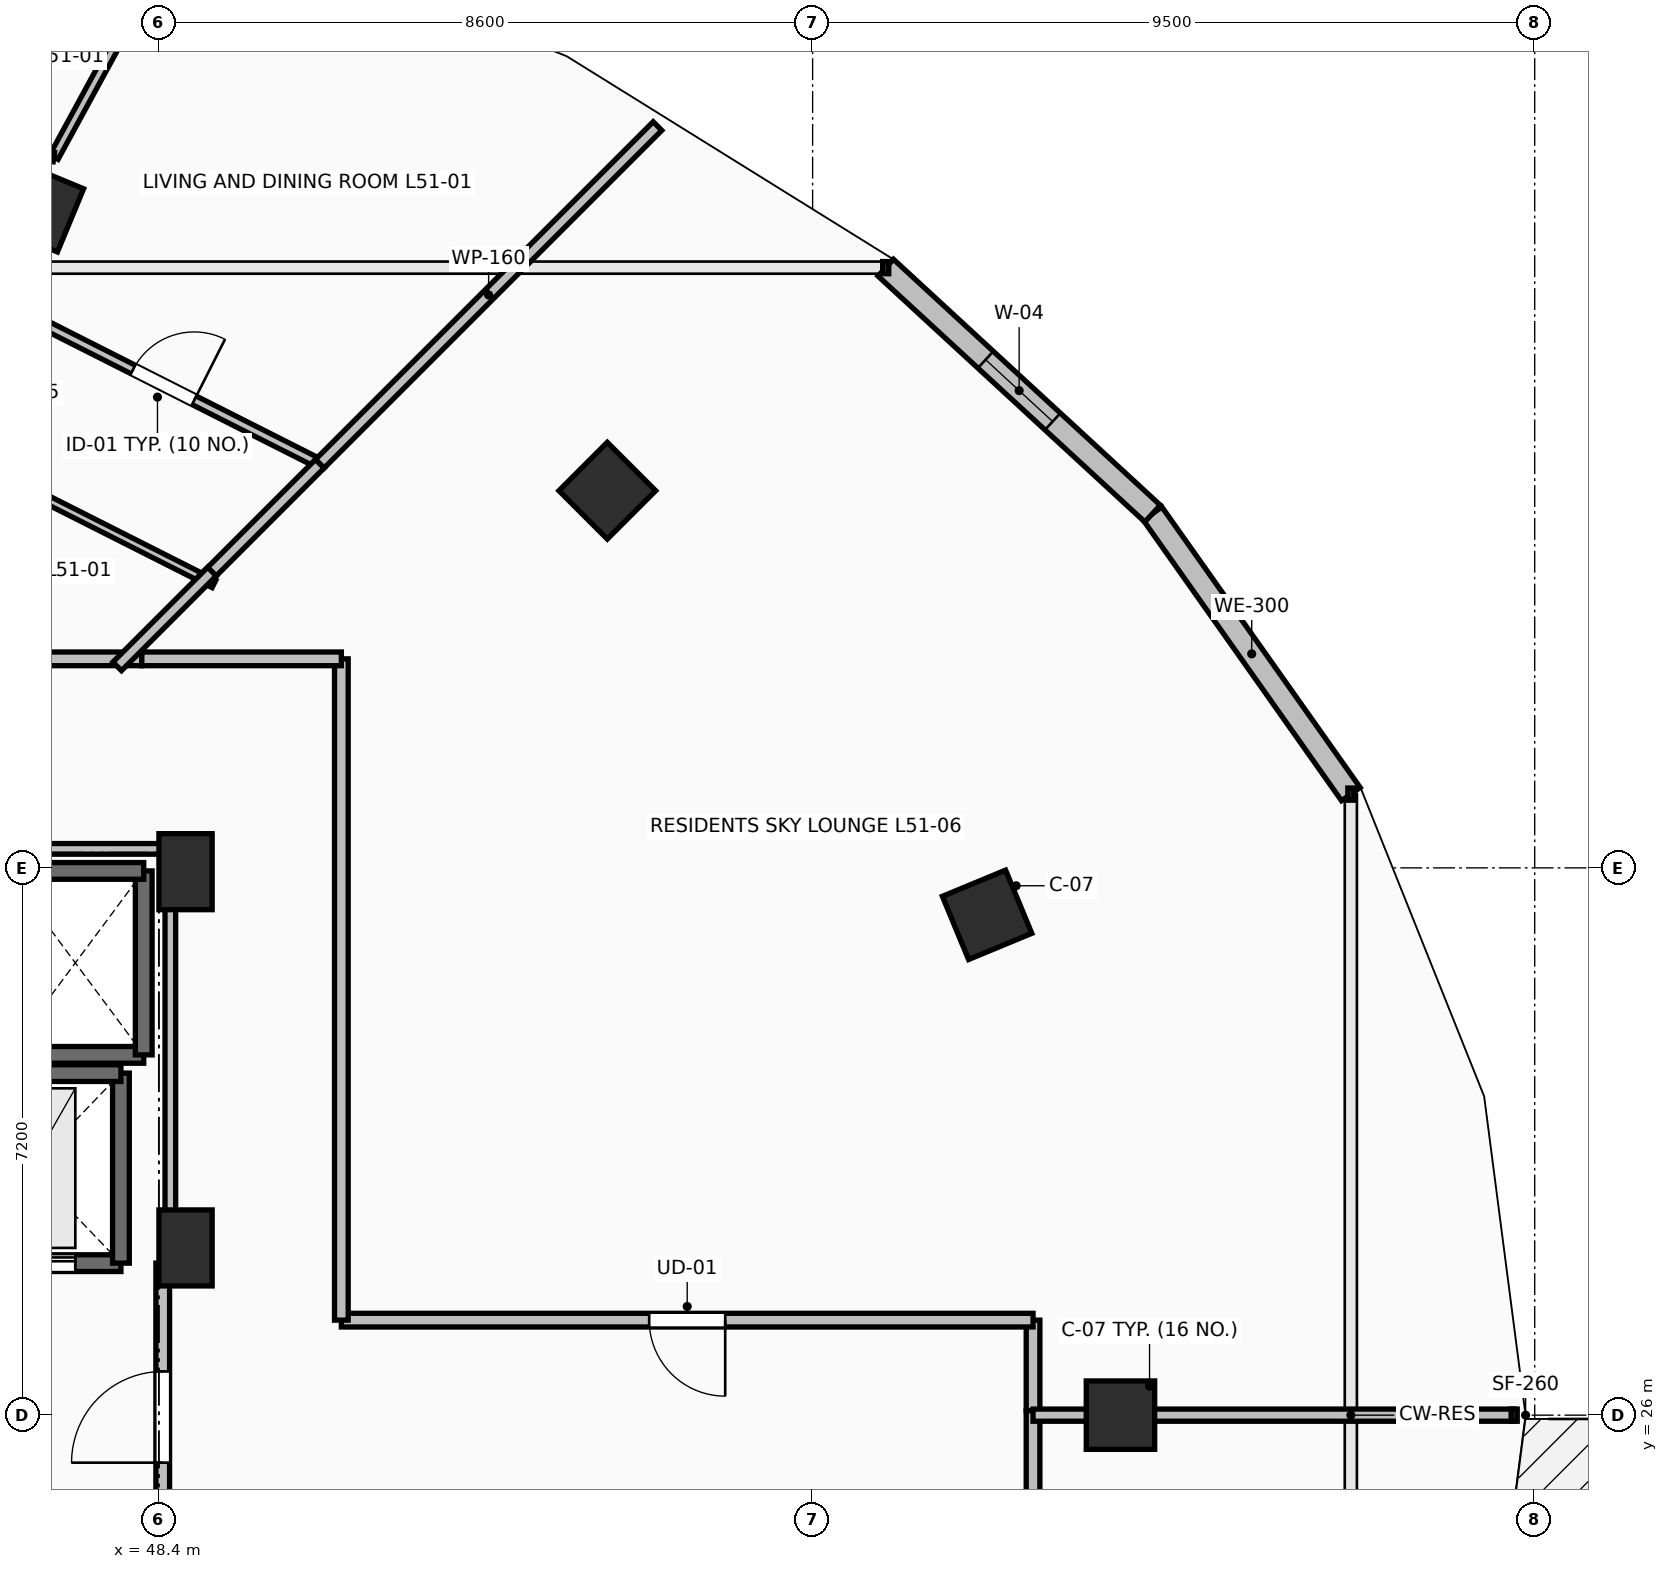
"""IFC4 building model, lengths in metres.
Left out: names, types, materials, properties, quantities, classifications, styles, units other than length and angle.
Written with IfcOpenShell. Run it as: python <this file> out.ifc"""

import sys

from ifc_helpers import new_model, si_unit, direction, frame, frame_2d, origin, origin_2d, place, context, subcontext, project, spatial, rectangle, extrude, element, fill, save


model = new_model("IFC4")
c1 = context("Model", 3, precision=1e-05, world=origin(), true_north=direction((0.0, 1.0)))
c2 = subcontext(c1, "Body", "Model", "MODEL_VIEW")
j1 = project(units=[si_unit("LENGTHUNIT", "METRE"), si_unit("PLANEANGLEUNIT", "RADIAN")], contexts=[c1])
p1 = place(None, origin())
s1 = spatial("IfcSite", under=j1, at=p1, CompositionType="ELEMENT")
p2 = place(p1, origin())
s2 = spatial("IfcBuilding", under=s1, at=p2, CompositionType="ELEMENT")
p3 = place(p2, frame((0.0, 0.0, 189.6)))
s3 = spatial("IfcBuildingStorey", under=s2, at=p3, CompositionType="ELEMENT", Elevation=189.6)
for number, where, z_axis, x_axis in (
    (1, (61.05, 26.0, 0.0), (0.0, 0.0, 1.0), (1.0, 0.0, 0.0)),
    (2, (59.295, 32.582, 0.0), (0.0, 0.0, 1.0), (0.924, 0.383, 0.0)),
    (3, (54.299, 38.162, 0.0), (0.0, 0.0, 1.0), (0.707, 0.707, 0.0)),
    (4, (46.821, 41.891, 0.0), (0.0, 0.0, 1.0), (0.383, 0.924, 0.0)),
):
    element("IfcColumn", number, at=place(p3, frame(where, z_axis=z_axis, x_axis=x_axis)), inside=s3, PredefinedType="COLUMN", context=c2, shape_type="SweptSolid", body=[
        extrude(rectangle(XDim=0.9, YDim=0.9, at=origin_2d()), origin(), (0.0, 0.0, 1.0), 3.5),
    ])
for number, where, z_axis, x_axis in (
    (5, (48.75, 33.15, 0.0), (0.0, 0.0, 1.0), (1.0, 0.0, 0.0)),
    (6, (48.75, 28.2, 0.0), (0.0, 0.0, 1.0), (1.0, 0.0, 0.0)),
):
    element("IfcColumn", number, at=place(p3, frame(where, z_axis=z_axis, x_axis=x_axis)), inside=s3, PredefinedType="PILASTER", context=c2, shape_type="SweptSolid", body=[
        extrude(rectangle(XDim=0.7, YDim=1.0, at=origin_2d()), origin(), (0.0, 0.0, 1.0), 3.5),
    ])
p4 = place(p3, frame((64.081, 34.17, 0.0), z_axis=(0.0, 0.0, 1.0), x_axis=(-0.577168747264, 0.81662490605, 0.0)))
e7 = element("IfcWall", 7, at=p4, inside=s3, PredefinedType="STANDARD", context=c2, shape_type="SweptSolid", body=[
    extrude(rectangle(XDim=4.52, YDim=0.3, at=frame_2d((2.26, 0.0))), origin(), (0.0, 0.0, 1.0), 3.24),
])
p5 = place(p3, frame((61.472, 37.861, 0.0), z_axis=(0.0, 0.0, 1.0), x_axis=(-0.735359993374, 0.677676678177, 0.0)))
e8 = element("IfcWall", 8, at=p5, inside=s3, PredefinedType="STANDARD", context=c2, shape_type="SweptSolid", body=[
    extrude(rectangle(XDim=4.774, YDim=0.3, at=frame_2d((2.387, 0.0))), origin(), (0.0, 0.0, 1.0), 3.24),
])
p6 = place(p5, frame((1.787, 0.0, 0.85)))
e9 = element("IfcOpeningElement", 9, at=p6, cuts=e8, PredefinedType="OPENING", context=c2, shape_type="SweptSolid", body=[
    extrude(rectangle(XDim=1.2, YDim=2.1, at=frame_2d((0.6, 1.05))), frame((0.0, 0.165, 0.0), z_axis=(0.0, -1.0, 0.0), x_axis=(1.0, 0.0, 0.0)), (0.0, 0.0, 1.0), 0.33),
])
p7 = place(p3, frame((46.4, 30.74, 0.0), z_axis=(0.0, 0.0, 1.0), x_axis=(1.0, 0.0, 0.0)))
e10 = element("IfcWall", 10, at=p7, inside=s3, PredefinedType="SOLIDWALL", context=c2, shape_type="SweptSolid", body=[
    extrude(rectangle(XDim=1.8, YDim=0.22, at=frame_2d((0.9, 0.0))), origin(), (0.0, 0.0, 1.0), 3.24),
])
p8 = place(p3, frame((48.2, 30.74, 0.0), z_axis=(0.0, 0.0, 1.0), x_axis=(0.0, 1.0, 0.0)))
e11 = element("IfcWall", 11, at=p8, inside=s3, PredefinedType="SOLIDWALL", context=c2, shape_type="SweptSolid", body=[
    extrude(rectangle(XDim=2.42, YDim=0.22, at=frame_2d((1.21, 0.0))), origin(), (0.0, 0.0, 1.0), 3.24),
])
p9 = place(p3, frame((48.2, 33.16, 0.0), z_axis=(0.0, 0.0, 1.0), x_axis=(-1.0, 0.0, 0.0)))
e12 = element("IfcWall", 12, at=p9, inside=s3, PredefinedType="SOLIDWALL", context=c2, shape_type="SweptSolid", body=[
    extrude(rectangle(XDim=1.8, YDim=0.22, at=frame_2d((0.9, 0.0))), origin(), (0.0, 0.0, 1.0), 3.24),
])
p10 = place(p3, frame((45.5, 28.0, 0.0), z_axis=(0.0, 0.0, 1.0), x_axis=(1.0, 0.0, 0.0)))
e13 = element("IfcWall", 13, at=p10, inside=s3, PredefinedType="SHEAR", context=c2, shape_type="SweptSolid", body=[
    extrude(rectangle(XDim=2.4, YDim=0.22, at=frame_2d((1.2, 0.0))), origin(), (0.0, 0.0, 1.0), 3.24),
])
p11 = place(p10, frame((0.6, 0.0, 0.0)))
e14 = element("IfcOpeningElement", 14, at=p11, cuts=e13, PredefinedType="OPENING", context=c2, shape_type="SweptSolid", body=[
    extrude(rectangle(XDim=1.2, YDim=2.2, at=frame_2d((0.6, 1.1))), frame((0.0, 0.125, 0.0), z_axis=(0.0, -1.0, 0.0), x_axis=(1.0, 0.0, 0.0)), (0.0, 0.0, 1.0), 0.25),
])
p12 = place(p3, frame((47.9, 28.0, 0.0), z_axis=(0.0, 0.0, 1.0), x_axis=(0.0, 1.0, 0.0)))
e15 = element("IfcWall", 15, at=p12, inside=s3, PredefinedType="SHEAR", context=c2, shape_type="SweptSolid", body=[
    extrude(rectangle(XDim=2.5, YDim=0.22, at=frame_2d((1.25, 0.0))), origin(), (0.0, 0.0, 1.0), 3.24),
])
p13 = place(p3, frame((47.9, 30.5, 0.0), z_axis=(0.0, 0.0, 1.0), x_axis=(-1.0, 0.0, 0.0)))
e16 = element("IfcWall", 16, at=p13, inside=s3, PredefinedType="SHEAR", context=c2, shape_type="SweptSolid", body=[
    extrude(rectangle(XDim=2.4, YDim=0.22, at=frame_2d((1.2, 0.0))), origin(), (0.0, 0.0, 1.0), 3.24),
])
p14 = place(p3, frame((48.45, 23.95, 0.0), z_axis=(0.0, 0.0, 1.0), x_axis=(0.0, 1.0, 0.0)))
e17 = element("IfcWall", 17, at=p14, inside=s3, PredefinedType="PARTITIONING", context=c2, shape_type="SweptSolid", body=[
    extrude(rectangle(XDim=4.05, YDim=0.18, at=frame_2d((2.025, 0.0))), origin(), (0.0, 0.0, 1.0), 3.24),
])
p15 = place(p14, frame((1.425, 0.0, 0.0)))
e18 = element("IfcOpeningElement", 18, at=p15, cuts=e17, PredefinedType="OPENING", context=c2, shape_type="SweptSolid", body=[
    extrude(rectangle(XDim=1.2, YDim=2.15, at=frame_2d((0.6, 1.075))), frame((0.0, 0.105, 0.0), z_axis=(0.0, -1.0, 0.0), x_axis=(1.0, 0.0, 0.0)), (0.0, 0.0, 1.0), 0.21),
])
p16 = place(p3, frame((48.175, 35.95, 0.0), z_axis=(0.0, 0.0, 1.0), x_axis=(-1.0, 0.0, 0.0)))
e19 = element("IfcWall", 19, at=p16, inside=s3, PredefinedType="PARTITIONING", context=c2, shape_type="SweptSolid", body=[
    extrude(rectangle(XDim=4.512, YDim=0.18, at=frame_2d((2.256, 0.0))), origin(), (0.0, 0.0, 1.0), 2.432),
])
p17 = place(p3, frame((59.9, 24.55, 0.0), z_axis=(0.0, 0.0, 1.0), x_axis=(0.0, 1.0, 0.0)))
e20 = element("IfcWall", 20, at=p17, inside=s3, PredefinedType="PARTITIONING", context=c2, shape_type="SweptSolid", body=[
    extrude(rectangle(XDim=1.51, YDim=0.18, at=frame_2d((0.755, 0.0))), origin(), (0.0, 0.0, 1.0), 2.432),
])
p18 = place(p3, frame((59.9, 26.06, 0.0), z_axis=(0.0, 0.0, 1.0), x_axis=(0.0, 1.0, 0.0)))
e21 = element("IfcWall", 21, at=p18, inside=s3, PredefinedType="PARTITIONING", context=c2, shape_type="SweptSolid", body=[
    extrude(rectangle(XDim=1.19, YDim=0.18, at=frame_2d((0.595, 0.0))), origin(), (0.0, 0.0, 1.0), 2.432),
])
p19 = place(p3, frame((59.9, 27.25, 0.0), z_axis=(0.0, 0.0, 1.0), x_axis=(-1.0, 0.0, 0.0)))
e22 = element("IfcWall", 22, at=p19, inside=s3, PredefinedType="PARTITIONING", context=c2, shape_type="SweptSolid", body=[
    extrude(rectangle(XDim=9.1, YDim=0.18, at=frame_2d((4.55, 0.0))), origin(), (0.0, 0.0, 1.0), 2.432),
])
p20 = place(p19, frame((4.05, 0.0, 0.0)))
e23 = element("IfcOpeningElement", 23, at=p20, cuts=e22, PredefinedType="OPENING", context=c2, shape_type="SweptSolid", body=[
    extrude(rectangle(XDim=1.0, YDim=2.15, at=frame_2d((0.5, 1.075))), frame((0.0, 0.105, 0.0), z_axis=(0.0, -1.0, 0.0), x_axis=(1.0, 0.0, 0.0)), (0.0, 0.0, 1.0), 0.21),
])
p21 = place(p3, frame((50.8, 27.25, 0.0), z_axis=(0.0, 0.0, 1.0), x_axis=(0.0, 1.0, 0.0)))
e24 = element("IfcWall", 24, at=p21, inside=s3, PredefinedType="PARTITIONING", context=c2, shape_type="SweptSolid", body=[
    extrude(rectangle(XDim=8.7, YDim=0.18, at=frame_2d((4.35, 0.0))), origin(), (0.0, 0.0, 1.0), 2.432),
])
p22 = place(p3, frame((50.8, 35.95, 0.0), z_axis=(0.0, 0.0, 1.0), x_axis=(-1.0, 0.0, 0.0)))
e25 = element("IfcWall", 25, at=p22, inside=s3, PredefinedType="PARTITIONING", context=c2, shape_type="SweptSolid", body=[
    extrude(rectangle(XDim=2.625, YDim=0.18, at=frame_2d((1.312, 0.0))), origin(), (0.0, 0.0, 1.0), 2.432),
])
p23 = place(p3, frame((46.408, 40.592, 0.0), z_axis=(0.0, 0.0, 1.0), x_axis=(0.89252026196, -0.451007297049, 0.0)))
e26 = element("IfcWall", 26, at=p23, inside=s3, PredefinedType="PARTITIONING", context=c2, shape_type="SweptSolid", body=[
    extrude(rectangle(XDim=4.603, YDim=0.125, at=frame_2d((2.301, 0.0))), origin(), (0.0, 0.0, 1.0), 2.432),
])
p24 = place(p23, frame((1.851, 0.0, 0.0)))
e27 = element("IfcOpeningElement", 27, at=p24, cuts=e26, PredefinedType="OPENING", context=c2, shape_type="SweptSolid", body=[
    extrude(rectangle(XDim=0.9, YDim=2.1, at=frame_2d((0.45, 1.05))), frame((0.0, 0.077, 0.0), z_axis=(0.0, -1.0, 0.0), x_axis=(1.0, 0.0, 0.0)), (0.0, 0.0, 1.0), 0.155),
])
p25 = place(p3, frame((47.896, 44.162, 0.0), z_axis=(0.0, 0.0, 1.0), x_axis=(-0.47839521225, -0.87814464691, 0.0)))
e28 = element("IfcWall", 28, at=p25, inside=s3, PredefinedType="PARTITIONING", context=c2, shape_type="SweptSolid", body=[
    extrude(rectangle(XDim=1.835, YDim=0.125, at=frame_2d((0.917, 0.0))), origin(), (0.0, 0.0, 1.0), 3.24),
])
p26 = place(p3, frame((47.018, 42.551, 0.0), z_axis=(0.0, 0.0, 1.0), x_axis=(-0.98887565722, 0.148744527827, 0.0)))
e29 = element("IfcWall", 29, at=p26, inside=s3, PredefinedType="PARTITIONING", context=c2, shape_type="SweptSolid", body=[
    extrude(rectangle(XDim=5.761, YDim=0.125, at=frame_2d((2.881, 0.0))), origin(), (0.0, 0.0, 1.0), 3.24),
])
p27 = place(p26, frame((2.43, 0.0, 0.0)))
e30 = element("IfcOpeningElement", 30, at=p27, cuts=e29, PredefinedType="OPENING", context=c2, shape_type="SweptSolid", body=[
    extrude(rectangle(XDim=0.9, YDim=2.1, at=frame_2d((0.45, 1.05))), frame((0.0, 0.077, 0.0), z_axis=(0.0, -1.0, 0.0), x_axis=(1.0, 0.0, 0.0)), (0.0, 0.0, 1.0), 0.155),
])
p28 = place(p3, frame((50.516, 38.516, 0.0), z_axis=(0.0, 0.0, 1.0), x_axis=(0.707106781187, 0.707106781187, 0.0)))
e31 = element("IfcWall", 31, at=p28, inside=s3, PredefinedType="PARTITIONING", context=c2, shape_type="SweptSolid", body=[
    extrude(rectangle(XDim=6.283, YDim=0.16, at=frame_2d((3.142, 0.0))), origin(), (0.0, 0.0, 1.0), 2.774),
])
p29 = place(p3, frame((45.264, 38.886, 0.0), z_axis=(0.0, 0.0, 1.0), x_axis=(0.892556527512, -0.450935522216, 0.0)))
e32 = element("IfcWall", 32, at=p29, inside=s3, PredefinedType="PARTITIONING", context=c2, shape_type="SweptSolid", body=[
    extrude(rectangle(XDim=4.325, YDim=0.11, at=frame_2d((2.162, 0.0))), origin(), (0.0, 0.0, 1.0), 2.432),
])
p30 = place(p3, frame((48.999, 36.999, 0.0), z_axis=(0.0, 0.0, 1.0), x_axis=(0.707106781187, 0.707106781187, 0.0)))
e33 = element("IfcWall", 33, at=p30, inside=s3, PredefinedType="PARTITIONING", context=c2, shape_type="SweptSolid", body=[
    extrude(rectangle(XDim=2.146, YDim=0.16, at=frame_2d((1.073, 0.0))), origin(), (0.0, 0.0, 1.0), 2.922),
])
p31 = place(p3, frame((47.851, 35.851, 0.0), z_axis=(0.0, 0.0, 1.0), x_axis=(0.707106781187, 0.707106781187, 0.0)))
e34 = element("IfcWall", 34, at=p31, inside=s3, PredefinedType="PARTITIONING", context=c2, shape_type="SweptSolid", body=[
    extrude(rectangle(XDim=1.763, YDim=0.16, at=frame_2d((0.882, 0.0))), origin(), (0.0, 0.0, 1.0), 2.432),
])
p32 = place(p3, frame((66.229, 26.0, 0.0), z_axis=(0.0, 0.0, 1.0), x_axis=(-1.0, 0.0, 0.0)))
e35 = element("IfcWall", 35, at=p32, inside=s3, PredefinedType="PARTITIONING", context=c2, shape_type="SweptSolid", body=[
    extrude(rectangle(XDim=6.329, YDim=0.16, at=frame_2d((3.165, 0.0))), origin(), (0.0, 0.0, 1.0), 2.432),
])
p33 = place(p3, frame((48.55, 28.196, 0.0), z_axis=(0.0, 0.0, 1.0), x_axis=(0.0, 1.0, 0.0)))
e36 = element("IfcWall", 36, at=p33, inside=s3, PredefinedType="PARTITIONING", context=c2, shape_type="SweptSolid", body=[
    extrude(rectangle(XDim=5.254, YDim=0.14, at=frame_2d((2.627, 0.0))), origin(), (0.0, 0.0, 1.0), 2.432),
])
p34 = place(p3, frame((48.55, 33.45, 0.0), z_axis=(0.0, 0.0, 1.0), x_axis=(-1.0, 0.0, 0.0)))
e37 = element("IfcWall", 37, at=p34, inside=s3, PredefinedType="PARTITIONING", context=c2, shape_type="SweptSolid", body=[
    extrude(rectangle(XDim=4.21, YDim=0.14, at=frame_2d((2.105, 0.0))), origin(), (0.0, 0.0, 1.0), 2.432),
])
p35 = place(p6, origin())
e38 = element("IfcWindow", 38, at=p35, inside=s3, PartitioningType="SINGLE_PANEL", PredefinedType="WINDOW", context=c2, shape_type="SweptSolid", body=[
    extrude(rectangle(XDim=1.2, YDim=2.1, at=frame_2d((0.6, 1.05))), frame((0.0, 0.03, 0.0), z_axis=(0.0, -1.0, 0.0), x_axis=(1.0, 0.0, 0.0)), (0.0, 0.0, 1.0), 0.06),
])
fill(e9, e38)
p36 = place(p11, origin())
e39 = element("IfcDoor", 39, at=p36, inside=s3, OperationType="SLIDING_TO_LEFT", PredefinedType="DOOR", context=c2, shape_type="SweptSolid", body=[
    extrude(rectangle(XDim=1.2, YDim=2.2, at=frame_2d((0.6, 1.1))), frame((0.0, 0.025, 0.0), z_axis=(0.0, -1.0, 0.0), x_axis=(1.0, 0.0, 0.0)), (0.0, 0.0, 1.0), 0.05),
])
fill(e14, e39)
p37 = place(p15, origin())
e40 = element("IfcDoor", 40, at=p37, inside=s3, OperationType="SINGLE_SWING_LEFT", PredefinedType="DOOR", context=c2, shape_type="SweptSolid", body=[
    extrude(rectangle(XDim=1.2, YDim=2.15, at=frame_2d((0.6, 1.075))), frame((0.0, 0.025, 0.0), z_axis=(0.0, -1.0, 0.0), x_axis=(1.0, 0.0, 0.0)), (0.0, 0.0, 1.0), 0.05),
])
fill(e18, e40)
p38 = place(p20, origin())
e41 = element("IfcDoor", 41, at=p38, inside=s3, OperationType="SINGLE_SWING_LEFT", PredefinedType="DOOR", context=c2, shape_type="SweptSolid", body=[
    extrude(rectangle(XDim=1.0, YDim=2.15, at=frame_2d((0.5, 1.075))), frame((0.0, 0.025, 0.0), z_axis=(0.0, -1.0, 0.0), x_axis=(1.0, 0.0, 0.0)), (0.0, 0.0, 1.0), 0.05),
])
fill(e23, e41)
p39 = place(p24, origin())
e42 = element("IfcDoor", 42, at=p39, inside=s3, OperationType="SINGLE_SWING_RIGHT", PredefinedType="DOOR", context=c2, shape_type="SweptSolid", body=[
    extrude(rectangle(XDim=0.9, YDim=2.1, at=frame_2d((0.45, 1.05))), frame((0.0, 0.025, 0.0), z_axis=(0.0, -1.0, 0.0), x_axis=(1.0, 0.0, 0.0)), (0.0, 0.0, 1.0), 0.05),
])
fill(e27, e42)
save(model, sys.argv[1])
